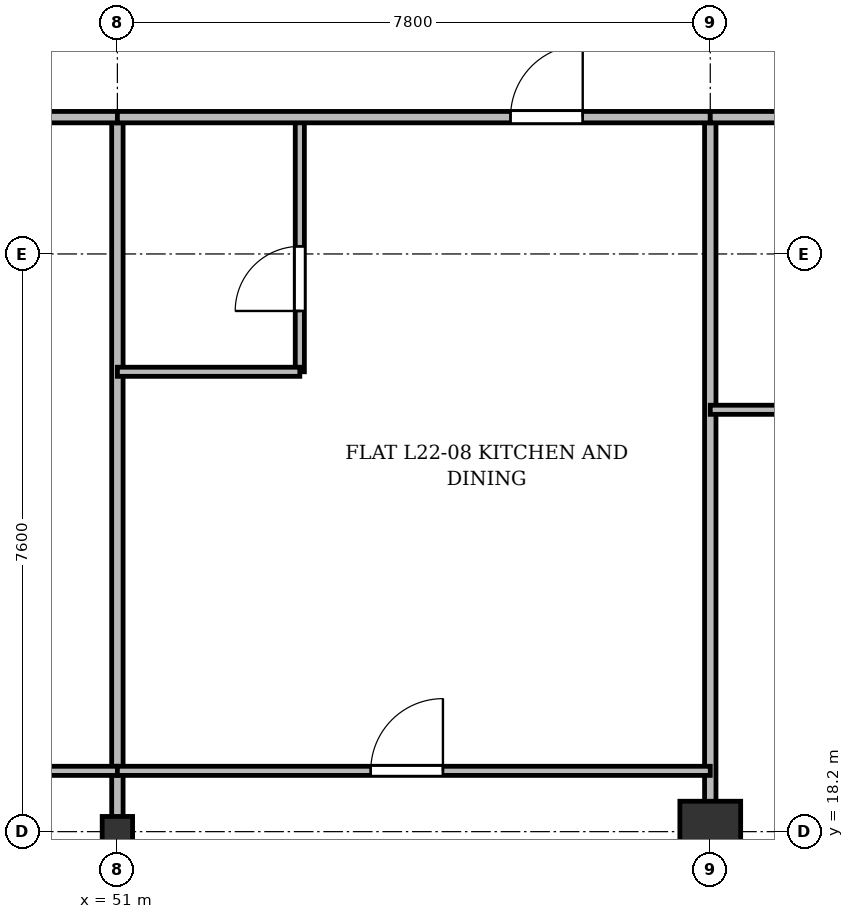
"""IFC4 building model, lengths in metres.
Left out: names, types, materials, properties, quantities, classifications, styles, units other than length and angle.
Written with IfcOpenShell. Run it as: python <this file> out.ifc"""

import sys

from ifc_helpers import new_model, si_unit, direction, frame, frame_2d, origin, origin_2d, place, context, subcontext, project, spatial, rectangle, i_section, extrude, source, transform, mapped, element, fill, save


model = new_model("IFC4")
c1 = context("Model", 3, precision=1e-05, world=origin(), true_north=direction((0.0, 1.0)))
c2 = subcontext(c1, "Body", "Model", "MODEL_VIEW")
j1 = project(units=[si_unit("LENGTHUNIT", "METRE"), si_unit("PLANEANGLEUNIT", "RADIAN")], contexts=[c1])
p1 = place(None, origin())
s1 = spatial("IfcSite", under=j1, at=p1, CompositionType="ELEMENT")
p2 = place(p1, origin())
s2 = spatial("IfcBuilding", under=s1, at=p2, CompositionType="ELEMENT")
p3 = place(p2, frame((0.0, 0.0, 88.9)))
s3 = spatial("IfcBuildingStorey", under=s2, at=p3, CompositionType="ELEMENT", Elevation=88.9)
m1 = source(origin(), c2, "Body", "SweptSolid", [
    extrude(i_section(OverallWidth=0.4, OverallDepth=0.4, WebThickness=0.022, FlangeThickness=0.035, at=origin_2d()), origin(), (0.0, 0.0, 1.0), 3.6),
])
p4 = place(p3, frame((51.0, 18.2, 0.0), z_axis=(0.0, 0.0, 1.0), x_axis=(1.0, 0.0, 0.0)))
e1 = element("IfcColumn", 1, at=p4, inside=s3, PredefinedType="COLUMN", context=c2, shape_type="MappedRepresentation", body=[
    mapped(m1, transform((0.0, 0.0, 0.0), x_axis=(1.0, 0.0, 0.0), y_axis=(0.0, 1.0, 0.0), z_axis=(0.0, 0.0, 1.0), scale=1.0)),
])
m2 = source(origin(), c2, "Body", "SweptSolid", [
    extrude(rectangle(XDim=0.8, YDim=0.8, at=origin_2d()), origin(), (0.0, 0.0, 1.0), 3.6),
])
p5 = place(p3, frame((58.8, 18.2, 0.0), z_axis=(0.0, 0.0, 1.0), x_axis=(1.0, 0.0, 0.0)))
e2 = element("IfcColumn", 2, at=p5, inside=s3, PredefinedType="COLUMN", context=c2, shape_type="MappedRepresentation", body=[
    mapped(m2, transform((0.0, 0.0, 0.0), x_axis=(1.0, 0.0, 0.0), y_axis=(0.0, 1.0, 0.0), z_axis=(0.0, 0.0, 1.0), scale=1.0)),
])
for number, where, z_axis, x_axis in (
    (3, (51.0, 3.145, 0.0), (0.0, 0.0, 1.0), (0.0, 1.0, 0.0)),
    (4, (58.8, 3.145, 0.0), (0.0, 0.0, 1.0), (0.0, 1.0, 0.0)),
):
    element("IfcWall", number, at=place(p3, frame(where, z_axis=z_axis, x_axis=x_axis)), inside=s3, PredefinedType="PARTITIONING", context=c2, shape_type="SweptSolid", body=[
        extrude(rectangle(XDim=24.455, YDim=0.15, at=frame_2d((12.228, 0.0))), origin(), (0.0, 0.0, 1.0), 2.84),
    ])
p6 = place(p3, frame((43.8, 19.0, 0.0), z_axis=(0.0, 0.0, 1.0), x_axis=(1.0, 0.0, 0.0)))
e5 = element("IfcWall", 5, at=p6, inside=s3, PredefinedType="PARTITIONING", context=c2, shape_type="SweptSolid", body=[
    extrude(rectangle(XDim=7.2, YDim=0.12, at=frame_2d((3.6, 0.0))), origin(), (0.0, 0.0, 1.0), 2.84),
])
p7 = place(p6, frame((3.125, 0.0, 0.0)))
e6 = element("IfcOpeningElement", 6, at=p7, cuts=e5, PredefinedType="OPENING", context=c2, shape_type="SweptSolid", body=[
    extrude(rectangle(XDim=0.95, YDim=2.15, at=frame_2d((0.475, 1.075))), frame((0.0, 0.07, 0.0), z_axis=(0.0, -1.0, 0.0), x_axis=(1.0, 0.0, 0.0)), (0.0, 0.0, 1.0), 0.14),
])
p8 = place(p3, frame((43.8, 27.6, 0.0), z_axis=(0.0, 0.0, 1.0), x_axis=(1.0, 0.0, 0.0)))
e7 = element("IfcWall", 7, at=p8, inside=s3, PredefinedType="PARTITIONING", context=c2, shape_type="SweptSolid", body=[
    extrude(rectangle(XDim=7.2, YDim=0.15, at=frame_2d((3.6, 0.0))), origin(), (0.0, 0.0, 1.0), 2.84),
])
p9 = place(p8, frame((4.706, 0.0, 0.0)))
e8 = element("IfcOpeningElement", 8, at=p9, cuts=e7, PredefinedType="OPENING", context=c2, shape_type="SweptSolid", body=[
    extrude(rectangle(XDim=0.95, YDim=2.15, at=frame_2d((0.475, 1.075))), frame((0.0, 0.085, 0.0), z_axis=(0.0, -1.0, 0.0), x_axis=(1.0, 0.0, 0.0)), (0.0, 0.0, 1.0), 0.17),
])
p10 = place(p3, frame((51.0, 19.0, 0.0), z_axis=(0.0, 0.0, 1.0), x_axis=(1.0, 0.0, 0.0)))
e9 = element("IfcWall", 9, at=p10, inside=s3, PredefinedType="PARTITIONING", context=c2, shape_type="SweptSolid", body=[
    extrude(rectangle(XDim=7.8, YDim=0.12, at=frame_2d((3.9, 0.0))), origin(), (0.0, 0.0, 1.0), 2.84),
])
p11 = place(p10, frame((3.333, 0.0, 0.0)))
e10 = element("IfcOpeningElement", 10, at=p11, cuts=e9, PredefinedType="OPENING", context=c2, shape_type="SweptSolid", body=[
    extrude(rectangle(XDim=0.95, YDim=2.15, at=frame_2d((0.475, 1.075))), frame((0.0, 0.07, 0.0), z_axis=(0.0, -1.0, 0.0), x_axis=(1.0, 0.0, 0.0)), (0.0, 0.0, 1.0), 0.14),
])
p12 = place(p3, frame((53.4, 24.25, 0.0), z_axis=(0.0, 0.0, 1.0), x_axis=(0.0, 1.0, 0.0)))
e11 = element("IfcWall", 11, at=p12, inside=s3, PredefinedType="PARTITIONING", context=c2, shape_type="SweptSolid", body=[
    extrude(rectangle(XDim=3.35, YDim=0.12, at=frame_2d((1.675, 0.0))), origin(), (0.0, 0.0, 1.0), 2.99),
])
p13 = place(p12, frame((0.8, 0.0, 0.0)))
e12 = element("IfcOpeningElement", 12, at=p13, cuts=e11, PredefinedType="OPENING", context=c2, shape_type="SweptSolid", body=[
    extrude(rectangle(XDim=0.85, YDim=2.1, at=frame_2d((0.425, 1.05))), frame((0.0, 0.07, 0.0), z_axis=(0.0, -1.0, 0.0), x_axis=(1.0, 0.0, 0.0)), (0.0, 0.0, 1.0), 0.14),
])
p14 = place(p3, frame((51.0, 24.25, 0.0), z_axis=(0.0, 0.0, 1.0), x_axis=(1.0, 0.0, 0.0)))
e13 = element("IfcWall", 13, at=p14, inside=s3, PredefinedType="PARTITIONING", context=c2, shape_type="SweptSolid", body=[
    extrude(rectangle(XDim=2.4, YDim=0.12, at=frame_2d((1.2, 0.0))), origin(), (0.0, 0.0, 1.0), 2.84),
])
p15 = place(p3, frame((51.0, 27.6, 0.0), z_axis=(0.0, 0.0, 1.0), x_axis=(1.0, 0.0, 0.0)))
e14 = element("IfcWall", 14, at=p15, inside=s3, PredefinedType="PARTITIONING", context=c2, shape_type="SweptSolid", body=[
    extrude(rectangle(XDim=7.8, YDim=0.15, at=frame_2d((3.9, 0.0))), origin(), (0.0, 0.0, 1.0), 2.84),
])
p16 = place(p15, frame((5.172, 0.0, 0.0)))
e15 = element("IfcOpeningElement", 15, at=p16, cuts=e14, PredefinedType="OPENING", context=c2, shape_type="SweptSolid", body=[
    extrude(rectangle(XDim=0.95, YDim=2.15, at=frame_2d((0.475, 1.075))), frame((0.0, 0.085, 0.0), z_axis=(0.0, -1.0, 0.0), x_axis=(1.0, 0.0, 0.0)), (0.0, 0.0, 1.0), 0.17),
])
p17 = place(p3, frame((58.8, 27.6, 0.0), z_axis=(0.0, 0.0, 1.0), x_axis=(1.0, 0.0, 0.0)))
e16 = element("IfcWall", 16, at=p17, inside=s3, PredefinedType="PARTITIONING", context=c2, shape_type="SweptSolid", body=[
    extrude(rectangle(XDim=4.8, YDim=0.15, at=frame_2d((2.4, 0.0))), origin(), (0.0, 0.0, 1.0), 2.84),
])
p18 = place(p17, frame((1.834, 0.0, 0.0)))
e17 = element("IfcOpeningElement", 17, at=p18, cuts=e16, PredefinedType="OPENING", context=c2, shape_type="SweptSolid", body=[
    extrude(rectangle(XDim=0.95, YDim=2.15, at=frame_2d((0.475, 1.075))), frame((0.0, 0.085, 0.0), z_axis=(0.0, -1.0, 0.0), x_axis=(1.0, 0.0, 0.0)), (0.0, 0.0, 1.0), 0.17),
])
p19 = place(p3, frame((58.8, 23.75, 0.0), z_axis=(0.0, 0.0, 1.0), x_axis=(1.0, 0.0, 0.0)))
e18 = element("IfcWall", 18, at=p19, inside=s3, PredefinedType="PARTITIONING", context=c2, shape_type="SweptSolid", body=[
    extrude(rectangle(XDim=4.8, YDim=0.12, at=frame_2d((2.4, 0.0))), origin(), (0.0, 0.0, 1.0), 2.84),
])
p20 = place(p19, frame((1.834, 0.0, 0.0)))
e19 = element("IfcOpeningElement", 19, at=p20, cuts=e18, PredefinedType="OPENING", context=c2, shape_type="SweptSolid", body=[
    extrude(rectangle(XDim=0.95, YDim=2.15, at=frame_2d((0.475, 1.075))), frame((0.0, 0.07, 0.0), z_axis=(0.0, -1.0, 0.0), x_axis=(1.0, 0.0, 0.0)), (0.0, 0.0, 1.0), 0.14),
])
m3 = source(origin(), c2, "Body", "SweptSolid", [
    extrude(rectangle(XDim=0.95, YDim=2.15, at=frame_2d((0.475, 1.075))), frame((0.0, 0.025, 0.0), z_axis=(0.0, -1.0, 0.0), x_axis=(1.0, 0.0, 0.0)), (0.0, 0.0, 1.0), 0.05),
])
p21 = place(p11, origin())
e20 = element("IfcDoor", 20, at=p21, inside=s3, OperationType="SINGLE_SWING_RIGHT", PredefinedType="DOOR", context=c2, shape_type="MappedRepresentation", body=[
    mapped(m3, transform((0.0, 0.0, 0.0), x_axis=(1.0, 0.0, 0.0), y_axis=(0.0, 1.0, 0.0), z_axis=(0.0, 0.0, 1.0), scale=1.0)),
])
fill(e10, e20)
m4 = source(origin(), c2, "Body", "SweptSolid", [
    extrude(rectangle(XDim=0.85, YDim=2.1, at=frame_2d((0.425, 1.05))), frame((0.0, 0.025, 0.0), z_axis=(0.0, -1.0, 0.0), x_axis=(1.0, 0.0, 0.0)), (0.0, 0.0, 1.0), 0.05),
])
p22 = place(p13, origin())
e21 = element("IfcDoor", 21, at=p22, inside=s3, OperationType="SINGLE_SWING_LEFT", PredefinedType="DOOR", context=c2, shape_type="MappedRepresentation", body=[
    mapped(m4, transform((0.0, 0.0, 0.0), x_axis=(1.0, 0.0, 0.0), y_axis=(0.0, 1.0, 0.0), z_axis=(0.0, 0.0, 1.0), scale=1.0)),
])
fill(e12, e21)
p23 = place(p16, origin())
e22 = element("IfcDoor", 22, at=p23, inside=s3, OperationType="SINGLE_SWING_RIGHT", PredefinedType="DOOR", context=c2, shape_type="MappedRepresentation", body=[
    mapped(m3, transform((0.0, 0.0, 0.0), x_axis=(1.0, 0.0, 0.0), y_axis=(0.0, 1.0, 0.0), z_axis=(0.0, 0.0, 1.0), scale=1.0)),
])
fill(e15, e22)
save(model, sys.argv[1])
